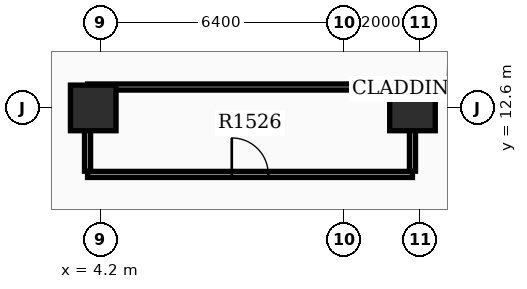
"""IFC4 building model, lengths in metres.
Left out: names, types, materials, properties, quantities, classifications, styles, units other than length and angle.
Written with IfcOpenShell. Run it as: python <this file> out.ifc"""

import sys

from ifc_helpers import new_model, si_unit, direction, frame, frame_2d, origin, origin_2d, place, context, subcontext, project, spatial, rectangle, extrude, element, fill, save


model = new_model("IFC4")
c1 = context("Model", 3, precision=1e-05, world=origin(), true_north=direction((0.0, 1.0)))
c2 = subcontext(c1, "Body", "Model", "MODEL_VIEW")
j1 = project(units=[si_unit("LENGTHUNIT", "METRE"), si_unit("PLANEANGLEUNIT", "RADIAN")], contexts=[c1])
p1 = place(None, origin())
s1 = spatial("IfcSite", under=j1, at=p1, CompositionType="ELEMENT")
p2 = place(p1, origin())
s2 = spatial("IfcBuilding", under=s1, at=p2, CompositionType="ELEMENT")
p3 = place(p2, frame((0.0, 0.0, 100.2)))
s3 = spatial("IfcBuildingStorey", under=s2, at=p3, CompositionType="ELEMENT", Elevation=100.2)
for number, where, z_axis, x_axis in (
    (1, (12.4, 12.6, 0.0), (0.0, 0.0, 1.0), (1.0, 0.0, 0.0)),
    (2, (4.0, 12.6, 0.0), (0.0, 0.0, 1.0), (1.0, 0.0, 0.0)),
):
    element("IfcColumn", number, at=place(p3, frame(where, z_axis=z_axis, x_axis=x_axis)), inside=s3, PredefinedType="COLUMN", context=c2, shape_type="SweptSolid", body=[
        extrude(rectangle(XDim=1.2, YDim=1.2, at=origin_2d()), origin(), (0.0, 0.0, 1.0), 4.5),
    ])
p4 = place(p3, frame((3.85, 10.85, 0.0), z_axis=(0.0, 0.0, 1.0), x_axis=(1.0, 0.0, 0.0)))
e3 = element("IfcWall", 3, at=p4, inside=s3, PredefinedType="PARTITIONING", context=c2, shape_type="SweptSolid", body=[
    extrude(rectangle(XDim=8.55, YDim=0.16, at=frame_2d((4.275, 0.0))), origin(), (0.0, 0.0, 1.0), 3.37),
])
p5 = place(p4, frame((3.795, 0.0, 0.0)))
e4 = element("IfcOpeningElement", 4, at=p5, cuts=e3, PredefinedType="OPENING", context=c2, shape_type="SweptSolid", body=[
    extrude(rectangle(XDim=0.96, YDim=2.15, at=frame_2d((0.48, 1.075))), frame((0.0, 0.09, 0.0), z_axis=(0.0, -1.0, 0.0), x_axis=(1.0, 0.0, 0.0)), (0.0, 0.0, 1.0), 0.18),
])
p6 = place(p3, frame((3.85, 13.15, 0.0), z_axis=(0.0, 0.0, 1.0), x_axis=(1.0, 0.0, 0.0)))
e5 = element("IfcWall", 5, at=p6, inside=s3, PredefinedType="PARTITIONING", context=c2, shape_type="SweptSolid", body=[
    extrude(rectangle(XDim=8.55, YDim=0.16, at=frame_2d((4.275, 0.0))), origin(), (0.0, 0.0, 1.0), 3.37),
])
for number, where, z_axis, x_axis in (
    (6, (3.85, 10.935, 0.0), (0.0, 0.0, 1.0), (0.0, 1.0, 0.0)),
    (7, (12.4, 10.935, 0.0), (0.0, 0.0, 1.0), (0.0, 1.0, 0.0)),
):
    element("IfcWall", number, at=place(p3, frame(where, z_axis=z_axis, x_axis=x_axis)), inside=s3, PredefinedType="PARTITIONING", context=c2, shape_type="SweptSolid", body=[
        extrude(rectangle(XDim=2.13, YDim=0.16, at=frame_2d((1.065, 0.0))), origin(), (0.0, 0.0, 1.0), 3.37),
    ])
p7 = place(p5, origin())
e8 = element("IfcDoor", 8, at=p7, inside=s3, OperationType="SINGLE_SWING_LEFT", PredefinedType="DOOR", context=c2, shape_type="SweptSolid", body=[
    extrude(rectangle(XDim=0.96, YDim=2.15, at=frame_2d((0.48, 1.075))), frame((0.0, 0.025, 0.0), z_axis=(0.0, -1.0, 0.0), x_axis=(1.0, 0.0, 0.0)), (0.0, 0.0, 1.0), 0.05),
])
fill(e4, e8)
save(model, sys.argv[1])
